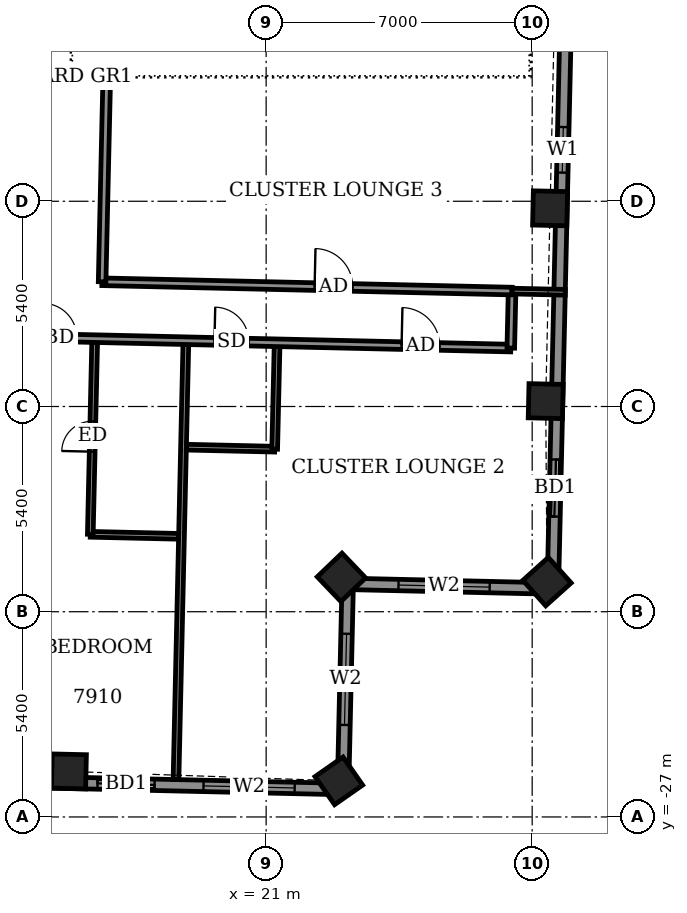
"""IFC4 building model, lengths in metres.
Left out: names, types, materials, properties, quantities, classifications, styles, units other than length and angle.
Written with IfcOpenShell. Run it as: python <this file> out.ifc"""

import sys

from ifc_helpers import new_model, si_unit, direction, frame, frame_2d, origin, origin_2d, place, context, subcontext, project, spatial, rectangle, extrude, element, fill, save


model = new_model("IFC4")
c1 = context("Model", 3, precision=1e-05, world=origin(), true_north=direction((0.0, 1.0)))
c2 = subcontext(c1, "Body", "Model", "MODEL_VIEW")
j1 = project(units=[si_unit("LENGTHUNIT", "METRE"), si_unit("PLANEANGLEUNIT", "RADIAN")], contexts=[c1])
p1 = place(None, origin())
s1 = spatial("IfcSite", under=j1, at=p1, CompositionType="ELEMENT")
p2 = place(p1, origin())
s2 = spatial("IfcBuilding", under=s1, at=p2, CompositionType="ELEMENT")
p3 = place(p2, frame((0.0, 0.0, 309.7)))
s3 = spatial("IfcBuildingStorey", under=s2, at=p3, CompositionType="ELEMENT", Elevation=309.7)
for number, where, z_axis, x_axis in (
    (1, (15.81, -25.802, -0.55), (0.0, 0.0, 1.0), (1.0, -0.023, 0.0)),
    (2, (22.912, -26.05, -0.55), (0.0, 0.0, 1.0), (0.82, 0.572, 0.0)),
    (3, (22.981, -20.696, -0.55), (0.0, 0.0, 1.0), (0.723, 0.691, 0.0)),
    (4, (28.39, -20.808, -0.55), (0.0, 0.0, 1.0), (0.744, 0.668, 0.0)),
    (5, (28.356, -16.059, -0.55), (0.0, 0.0, 1.0), (0.023, 1.0, 0.0)),
    (6, (28.471, -10.986, -0.55), (0.0, 0.0, 1.0), (0.023, 1.0, 0.0)),
):
    element("IfcColumn", number, at=place(p3, frame(where, z_axis=z_axis, x_axis=x_axis)), inside=s3, PredefinedType="COLUMN", context=c2, shape_type="SweptSolid", body=[
        extrude(rectangle(XDim=0.9, YDim=0.9, at=origin_2d()), origin(), (0.0, 0.0, 1.0), 3.6),
    ])
p4 = place(p3, frame((28.544, -20.99, 0.0), z_axis=(0.0, 0.0, 1.0), x_axis=(0.022676396018, 0.999742857471, 0.0)))
e7 = element("IfcWall", 7, at=p4, inside=s3, PredefinedType="SOLIDWALL", context=c2, shape_type="SweptSolid", body=[
    extrude(rectangle(XDim=15.525, YDim=0.3, at=frame_2d((7.762, 0.0))), origin(), (0.0, 0.0, 1.0), 2.55),
])
p5 = place(p4, frame((1.895, 0.0, 0.0)))
e8 = element("IfcOpeningElement", 8, at=p5, cuts=e7, PredefinedType="OPENING", context=c2, shape_type="SweptSolid", body=[
    extrude(rectangle(XDim=1.5, YDim=2.4, at=frame_2d((0.75, 1.2))), frame((0.0, 0.16, 0.0), z_axis=(0.0, -1.0, 0.0), x_axis=(1.0, 0.0, 0.0)), (0.0, 0.0, 1.0), 0.32),
])
p6 = place(p4, frame((10.946, 0.0, 0.9)))
e9 = element("IfcOpeningElement", 9, at=p6, cuts=e7, PredefinedType="OPENING", context=c2, shape_type="SweptSolid", body=[
    extrude(rectangle(XDim=1.2, YDim=1.5, at=frame_2d((0.6, 0.75))), frame((0.0, 0.16, 0.0), z_axis=(0.0, -1.0, 0.0), x_axis=(1.0, 0.0, 0.0)), (0.0, 0.0, 1.0), 0.32),
])
p7 = place(p3, frame((-28.264, -25.102, 0.0), z_axis=(0.0, 0.0, 1.0), x_axis=(0.999742520573, -0.022691244094, 0.0)))
e10 = element("IfcWall", 10, at=p7, inside=s3, PredefinedType="SOLIDWALL", context=c2, shape_type="SweptSolid", body=[
    extrude(rectangle(XDim=51.3, YDim=0.3, at=frame_2d((25.65, 0.0))), origin(), (0.0, 0.0, 1.0), 2.5),
])
p8 = place(p7, frame((1.654, 0.0, 0.0)))
e11 = element("IfcOpeningElement", 11, at=p8, cuts=e10, PredefinedType="OPENING", context=c2, shape_type="SweptSolid", body=[
    extrude(rectangle(XDim=1.5, YDim=2.4, at=frame_2d((0.75, 1.2))), frame((0.0, 0.16, 0.0), z_axis=(0.0, -1.0, 0.0), x_axis=(1.0, 0.0, 0.0)), (0.0, 0.0, 1.0), 0.32),
])
p9 = place(p7, frame((4.936, 0.0, 0.0)))
e12 = element("IfcOpeningElement", 12, at=p9, cuts=e10, PredefinedType="OPENING", context=c2, shape_type="SweptSolid", body=[
    extrude(rectangle(XDim=1.5, YDim=2.4, at=frame_2d((0.75, 1.2))), frame((0.0, 0.16, 0.0), z_axis=(0.0, -1.0, 0.0), x_axis=(1.0, 0.0, 0.0)), (0.0, 0.0, 1.0), 0.32),
])
p10 = place(p7, frame((9.975, 0.0, 0.0)))
e13 = element("IfcOpeningElement", 13, at=p10, cuts=e10, PredefinedType="OPENING", context=c2, shape_type="SweptSolid", body=[
    extrude(rectangle(XDim=1.5, YDim=2.4, at=frame_2d((0.75, 1.2))), frame((0.0, 0.16, 0.0), z_axis=(0.0, -1.0, 0.0), x_axis=(1.0, 0.0, 0.0)), (0.0, 0.0, 1.0), 0.32),
])
p11 = place(p7, frame((15.196, 0.0, 0.0)))
e14 = element("IfcOpeningElement", 14, at=p11, cuts=e10, PredefinedType="OPENING", context=c2, shape_type="SweptSolid", body=[
    extrude(rectangle(XDim=1.5, YDim=2.4, at=frame_2d((0.75, 1.2))), frame((0.0, 0.16, 0.0), z_axis=(0.0, -1.0, 0.0), x_axis=(1.0, 0.0, 0.0)), (0.0, 0.0, 1.0), 0.32),
])
p12 = place(p7, frame((18.5, 0.0, 0.0)))
e15 = element("IfcOpeningElement", 15, at=p12, cuts=e10, PredefinedType="OPENING", context=c2, shape_type="SweptSolid", body=[
    extrude(rectangle(XDim=1.5, YDim=2.4, at=frame_2d((0.75, 1.2))), frame((0.0, 0.16, 0.0), z_axis=(0.0, -1.0, 0.0), x_axis=(1.0, 0.0, 0.0)), (0.0, 0.0, 1.0), 0.32),
])
p13 = place(p7, frame((23.157, 0.0, 0.0)))
e16 = element("IfcOpeningElement", 16, at=p13, cuts=e10, PredefinedType="OPENING", context=c2, shape_type="SweptSolid", body=[
    extrude(rectangle(XDim=1.5, YDim=2.4, at=frame_2d((0.75, 1.2))), frame((0.0, 0.16, 0.0), z_axis=(0.0, -1.0, 0.0), x_axis=(1.0, 0.0, 0.0)), (0.0, 0.0, 1.0), 0.32),
])
p14 = place(p7, frame((26.643, 0.0, 0.0)))
e17 = element("IfcOpeningElement", 17, at=p14, cuts=e10, PredefinedType="OPENING", context=c2, shape_type="SweptSolid", body=[
    extrude(rectangle(XDim=1.5, YDim=2.4, at=frame_2d((0.75, 1.2))), frame((0.0, 0.16, 0.0), z_axis=(0.0, -1.0, 0.0), x_axis=(1.0, 0.0, 0.0)), (0.0, 0.0, 1.0), 0.32),
])
p15 = place(p7, frame((31.275, 0.0, 0.0)))
e18 = element("IfcOpeningElement", 18, at=p15, cuts=e10, PredefinedType="OPENING", context=c2, shape_type="SweptSolid", body=[
    extrude(rectangle(XDim=1.5, YDim=2.4, at=frame_2d((0.75, 1.2))), frame((0.0, 0.16, 0.0), z_axis=(0.0, -1.0, 0.0), x_axis=(1.0, 0.0, 0.0)), (0.0, 0.0, 1.0), 0.32),
])
p16 = place(p7, frame((34.578, 0.0, 0.0)))
e19 = element("IfcOpeningElement", 19, at=p16, cuts=e10, PredefinedType="OPENING", context=c2, shape_type="SweptSolid", body=[
    extrude(rectangle(XDim=1.5, YDim=2.4, at=frame_2d((0.75, 1.2))), frame((0.0, 0.16, 0.0), z_axis=(0.0, -1.0, 0.0), x_axis=(1.0, 0.0, 0.0)), (0.0, 0.0, 1.0), 0.32),
])
p17 = place(p7, frame((39.75, 0.0, 0.0)))
e20 = element("IfcOpeningElement", 20, at=p17, cuts=e10, PredefinedType="OPENING", context=c2, shape_type="SweptSolid", body=[
    extrude(rectangle(XDim=1.5, YDim=2.4, at=frame_2d((0.75, 1.2))), frame((0.0, 0.16, 0.0), z_axis=(0.0, -1.0, 0.0), x_axis=(1.0, 0.0, 0.0)), (0.0, 0.0, 1.0), 0.32),
])
p18 = place(p7, frame((44.839, 0.0, 0.0)))
e21 = element("IfcOpeningElement", 21, at=p18, cuts=e10, PredefinedType="OPENING", context=c2, shape_type="SweptSolid", body=[
    extrude(rectangle(XDim=1.5, YDim=2.4, at=frame_2d((0.75, 1.2))), frame((0.0, 0.16, 0.0), z_axis=(0.0, -1.0, 0.0), x_axis=(1.0, 0.0, 0.0)), (0.0, 0.0, 1.0), 0.32),
])
p19 = place(p7, frame((47.628, 0.0, 0.9)))
e22 = element("IfcOpeningElement", 22, at=p19, cuts=e10, PredefinedType="OPENING", context=c2, shape_type="SweptSolid", body=[
    extrude(rectangle(XDim=2.4, YDim=1.5, at=frame_2d((1.2, 0.75))), frame((0.0, 0.16, 0.0), z_axis=(0.0, -1.0, 0.0), x_axis=(1.0, 0.0, 0.0)), (0.0, 0.0, 1.0), 0.32),
])
p20 = place(p3, frame((23.023, -26.266, 0.0), z_axis=(0.0, 0.0, 1.0), x_axis=(0.022784045517, 0.999740409941, 0.0)))
e23 = element("IfcWall", 23, at=p20, inside=s3, PredefinedType="SOLIDWALL", context=c2, shape_type="SweptSolid", body=[
    extrude(rectangle(XDim=5.401, YDim=0.3, at=frame_2d((2.7, 0.0))), origin(), (0.0, 0.0, 1.0), 2.55),
])
p21 = place(p20, frame((1.687, 0.0, 0.9)))
e24 = element("IfcOpeningElement", 24, at=p21, cuts=e23, PredefinedType="OPENING", context=c2, shape_type="SweptSolid", body=[
    extrude(rectangle(XDim=2.4, YDim=1.5, at=frame_2d((1.2, 0.75))), frame((0.0, 0.16, 0.0), z_axis=(0.0, -1.0, 0.0), x_axis=(1.0, 0.0, 0.0)), (0.0, 0.0, 1.0), 0.32),
])
p22 = place(p3, frame((23.146, -20.867, 0.0), z_axis=(0.0, 0.0, 1.0), x_axis=(0.999740292565, -0.022789195272, 0.0)))
e25 = element("IfcWall", 25, at=p22, inside=s3, PredefinedType="SOLIDWALL", context=c2, shape_type="SweptSolid", body=[
    extrude(rectangle(XDim=5.399, YDim=0.3, at=frame_2d((2.7, 0.0))), origin(), (0.0, 0.0, 1.0), 2.55),
])
p23 = place(p22, frame((1.337, 0.0, 0.9)))
e26 = element("IfcOpeningElement", 26, at=p23, cuts=e25, PredefinedType="OPENING", context=c2, shape_type="SweptSolid", body=[
    extrude(rectangle(XDim=2.4, YDim=1.5, at=frame_2d((1.2, 0.75))), frame((0.0, 0.16, 0.0), z_axis=(0.0, -1.0, 0.0), x_axis=(1.0, 0.0, 0.0)), (0.0, 0.0, 1.0), 0.32),
])
p24 = place(p3, frame((18.628, -26.016, 0.0), z_axis=(0.0, 0.0, 1.0), x_axis=(0.022623082162, 0.999744065325, 0.0)))
e27 = element("IfcWall", 27, at=p24, inside=s3, PredefinedType="PARTITIONING", context=c2, shape_type="SweptSolid", body=[
    extrude(rectangle(XDim=11.45, YDim=0.15, at=frame_2d((5.725, 0.0))), origin(), (0.0, 0.0, 1.0), 2.5),
])
p25 = place(p3, frame((16.373, -19.563, 0.0), z_axis=(0.0, 0.0, 1.0), x_axis=(0.999740478815, -0.022781023197, 0.0)))
e28 = element("IfcWall", 28, at=p25, inside=s3, PredefinedType="PARTITIONING", context=c2, shape_type="SweptSolid", body=[
    extrude(rectangle(XDim=2.325, YDim=0.15, at=frame_2d((1.163, 0.0))), origin(), (0.0, 0.0, 1.0), 3.05),
])
p26 = place(p3, frame((16.373, -19.563, 0.0), z_axis=(0.0, 0.0, 1.0), x_axis=(0.022773025649, 0.999740661023, 0.0)))
e29 = element("IfcWall", 29, at=p26, inside=s3, PredefinedType="PARTITIONING", context=c2, shape_type="SweptSolid", body=[
    extrude(rectangle(XDim=5.049, YDim=0.15, at=frame_2d((2.525, 0.0))), origin(), (0.0, 0.0, 1.0), 3.05),
])
p27 = place(p26, frame((2.175, 0.0, 0.0)))
e30 = element("IfcOpeningElement", 30, at=p27, cuts=e29, PredefinedType="OPENING", context=c2, shape_type="SweptSolid", body=[
    extrude(rectangle(XDim=0.8, YDim=2.1, at=frame_2d((0.4, 1.05))), frame((0.0, 0.085, 0.0), z_axis=(0.0, -1.0, 0.0), x_axis=(1.0, 0.0, 0.0)), (0.0, 0.0, 1.0), 0.17),
])
p28 = place(p3, frame((18.901, -17.27, 0.0), z_axis=(0.0, 0.0, 1.0), x_axis=(0.99974031529, -0.022788198363, 0.0)))
e31 = element("IfcWall", 31, at=p28, inside=s3, PredefinedType="PARTITIONING", context=c2, shape_type="SweptSolid", body=[
    extrude(rectangle(XDim=2.325, YDim=0.15, at=frame_2d((1.162, 0.0))), origin(), (0.0, 0.0, 1.0), 3.05),
])
p29 = place(p3, frame((21.225, -17.323, 0.0), z_axis=(0.0, 0.0, 1.0), x_axis=(0.022961663075, 0.999736346258, 0.0)))
e32 = element("IfcWall", 32, at=p29, inside=s3, PredefinedType="PARTITIONING", context=c2, shape_type="SweptSolid", body=[
    extrude(rectangle(XDim=2.701, YDim=0.15, at=frame_2d((1.35, 0.0))), origin(), (0.0, 0.0, 1.0), 3.05),
])
p30 = place(p3, frame((-31.347, -13.329, 0.0), z_axis=(0.0, 0.0, 1.0), x_axis=(0.999742613079, -0.022687168058, 0.0)))
e33 = element("IfcWall", 33, at=p30, inside=s3, PredefinedType="PARTITIONING", context=c2, shape_type="SweptSolid", body=[
    extrude(rectangle(XDim=58.799, YDim=0.2, at=frame_2d((29.399, 0.0))), origin(), (0.0, 0.0, 1.0), 3.05),
])
p31 = place(p30, frame((1.35, 0.0, 0.0)))
e34 = element("IfcOpeningElement", 34, at=p31, cuts=e33, PredefinedType="OPENING", context=c2, shape_type="SweptSolid", body=[
    extrude(rectangle(XDim=1.0, YDim=2.1, at=frame_2d((0.5, 1.05))), frame((0.0, 0.11, 0.0), z_axis=(0.0, -1.0, 0.0), x_axis=(1.0, 0.0, 0.0)), (0.0, 0.0, 1.0), 0.22),
])
p32 = place(p30, frame((5.95, 0.0, 0.0)))
e35 = element("IfcOpeningElement", 35, at=p32, cuts=e33, PredefinedType="OPENING", context=c2, shape_type="SweptSolid", body=[
    extrude(rectangle(XDim=0.9, YDim=2.1, at=frame_2d((0.45, 1.05))), frame((0.0, 0.11, 0.0), z_axis=(0.0, -1.0, 0.0), x_axis=(1.0, 0.0, 0.0)), (0.0, 0.0, 1.0), 0.22),
])
p33 = place(p30, frame((10.575, 0.0, 0.0)))
e36 = element("IfcOpeningElement", 36, at=p33, cuts=e33, PredefinedType="OPENING", context=c2, shape_type="SweptSolid", body=[
    extrude(rectangle(XDim=0.9, YDim=2.1, at=frame_2d((0.45, 1.05))), frame((0.0, 0.11, 0.0), z_axis=(0.0, -1.0, 0.0), x_axis=(1.0, 0.0, 0.0)), (0.0, 0.0, 1.0), 0.22),
])
p34 = place(p30, frame((12.425, 0.0, 0.0)))
e37 = element("IfcOpeningElement", 37, at=p34, cuts=e33, PredefinedType="OPENING", context=c2, shape_type="SweptSolid", body=[
    extrude(rectangle(XDim=0.9, YDim=2.1, at=frame_2d((0.45, 1.05))), frame((0.0, 0.11, 0.0), z_axis=(0.0, -1.0, 0.0), x_axis=(1.0, 0.0, 0.0)), (0.0, 0.0, 1.0), 0.22),
])
p35 = place(p30, frame((19.075, 0.0, 0.0)))
e38 = element("IfcOpeningElement", 38, at=p35, cuts=e33, PredefinedType="OPENING", context=c2, shape_type="SweptSolid", body=[
    extrude(rectangle(XDim=0.9, YDim=2.1, at=frame_2d((0.45, 1.05))), frame((0.0, 0.11, 0.0), z_axis=(0.0, -1.0, 0.0), x_axis=(1.0, 0.0, 0.0)), (0.0, 0.0, 1.0), 0.22),
])
p36 = place(p30, frame((20.95, 0.0, 0.0)))
e39 = element("IfcOpeningElement", 39, at=p36, cuts=e33, PredefinedType="OPENING", context=c2, shape_type="SweptSolid", body=[
    extrude(rectangle(XDim=0.9, YDim=2.1, at=frame_2d((0.45, 1.05))), frame((0.0, 0.11, 0.0), z_axis=(0.0, -1.0, 0.0), x_axis=(1.0, 0.0, 0.0)), (0.0, 0.0, 1.0), 0.22),
])
p37 = place(p30, frame((27.625, 0.0, 0.0)))
e40 = element("IfcOpeningElement", 40, at=p37, cuts=e33, PredefinedType="OPENING", context=c2, shape_type="SweptSolid", body=[
    extrude(rectangle(XDim=0.9, YDim=2.1, at=frame_2d((0.45, 1.05))), frame((0.0, 0.11, 0.0), z_axis=(0.0, -1.0, 0.0), x_axis=(1.0, 0.0, 0.0)), (0.0, 0.0, 1.0), 0.22),
])
p38 = place(p30, frame((29.475, 0.0, 0.0)))
e41 = element("IfcOpeningElement", 41, at=p38, cuts=e33, PredefinedType="OPENING", context=c2, shape_type="SweptSolid", body=[
    extrude(rectangle(XDim=0.9, YDim=2.1, at=frame_2d((0.45, 1.05))), frame((0.0, 0.11, 0.0), z_axis=(0.0, -1.0, 0.0), x_axis=(1.0, 0.0, 0.0)), (0.0, 0.0, 1.0), 0.22),
])
p39 = place(p30, frame((36.125, 0.0, 0.0)))
e42 = element("IfcOpeningElement", 42, at=p39, cuts=e33, PredefinedType="OPENING", context=c2, shape_type="SweptSolid", body=[
    extrude(rectangle(XDim=0.9, YDim=2.1, at=frame_2d((0.45, 1.05))), frame((0.0, 0.11, 0.0), z_axis=(0.0, -1.0, 0.0), x_axis=(1.0, 0.0, 0.0)), (0.0, 0.0, 1.0), 0.22),
])
p40 = place(p30, frame((37.95, 0.0, 0.0)))
e43 = element("IfcOpeningElement", 43, at=p40, cuts=e33, PredefinedType="OPENING", context=c2, shape_type="SweptSolid", body=[
    extrude(rectangle(XDim=0.9, YDim=2.1, at=frame_2d((0.45, 1.05))), frame((0.0, 0.11, 0.0), z_axis=(0.0, -1.0, 0.0), x_axis=(1.0, 0.0, 0.0)), (0.0, 0.0, 1.0), 0.22),
])
p41 = place(p30, frame((44.6, 0.0, 0.0)))
e44 = element("IfcOpeningElement", 44, at=p41, cuts=e33, PredefinedType="OPENING", context=c2, shape_type="SweptSolid", body=[
    extrude(rectangle(XDim=0.9, YDim=2.1, at=frame_2d((0.45, 1.05))), frame((0.0, 0.11, 0.0), z_axis=(0.0, -1.0, 0.0), x_axis=(1.0, 0.0, 0.0)), (0.0, 0.0, 1.0), 0.22),
])
p42 = place(p30, frame((46.475, 0.0, 0.0)))
e45 = element("IfcOpeningElement", 45, at=p42, cuts=e33, PredefinedType="OPENING", context=c2, shape_type="SweptSolid", body=[
    extrude(rectangle(XDim=0.9, YDim=2.1, at=frame_2d((0.45, 1.05))), frame((0.0, 0.11, 0.0), z_axis=(0.0, -1.0, 0.0), x_axis=(1.0, 0.0, 0.0)), (0.0, 0.0, 1.0), 0.22),
])
p43 = place(p30, frame((55.925, 0.0, 0.0)))
e46 = element("IfcOpeningElement", 46, at=p43, cuts=e33, PredefinedType="OPENING", context=c2, shape_type="SweptSolid", body=[
    extrude(rectangle(XDim=1.0, YDim=2.1, at=frame_2d((0.5, 1.05))), frame((0.0, 0.11, 0.0), z_axis=(0.0, -1.0, 0.0), x_axis=(1.0, 0.0, 0.0)), (0.0, 0.0, 1.0), 0.22),
])
p44 = place(p30, frame((51.0, 0.0, 0.0)))
e47 = element("IfcOpeningElement", 47, at=p44, cuts=e33, PredefinedType="OPENING", context=c2, shape_type="SweptSolid", body=[
    extrude(rectangle(XDim=0.9, YDim=2.1, at=frame_2d((0.45, 1.05))), frame((0.0, 0.11, 0.0), z_axis=(0.0, -1.0, 0.0), x_axis=(1.0, 0.0, 0.0)), (0.0, 0.0, 1.0), 0.22),
])
p45 = place(p3, frame((27.437, -14.663, 0.0), z_axis=(0.0, 0.0, 1.0), x_axis=(0.022617910375, 0.999744182344, 0.0)))
e48 = element("IfcWall", 48, at=p45, inside=s3, PredefinedType="PARTITIONING", context=c2, shape_type="SweptSolid", body=[
    extrude(rectangle(XDim=1.5, YDim=0.2, at=frame_2d((0.75, 0.0))), origin(), (0.0, 0.0, 1.0), 3.05),
])
p46 = place(p3, frame((16.679, -12.918, 0.0), z_axis=(0.0, 0.0, 1.0), x_axis=(0.999742162372, -0.022707020428, 0.0)))
e49 = element("IfcWall", 49, at=p46, inside=s3, PredefinedType="PARTITIONING", context=c2, shape_type="SweptSolid", body=[
    extrude(rectangle(XDim=10.795, YDim=0.2, at=frame_2d((5.397, 0.0))), origin(), (0.0, 0.0, 1.0), 3.05),
])
p47 = place(p46, frame((5.598, 0.0, 0.0)))
e50 = element("IfcOpeningElement", 50, at=p47, cuts=e49, PredefinedType="OPENING", context=c2, shape_type="SweptSolid", body=[
    extrude(rectangle(XDim=1.0, YDim=2.1, at=frame_2d((0.5, 1.05))), frame((0.0, 0.11, 0.0), z_axis=(0.0, -1.0, 0.0), x_axis=(1.0, 0.0, 0.0)), (0.0, 0.0, 1.0), 0.22),
])
p48 = place(p3, frame((16.684, -12.919, 0.0), z_axis=(0.0, 0.0, 1.0), x_axis=(0.022667483124, 0.999743059595, 0.0)))
e51 = element("IfcWall", 51, at=p48, inside=s3, PredefinedType="PARTITIONING", context=c2, shape_type="SweptSolid", body=[
    extrude(rectangle(XDim=5.245, YDim=0.2, at=frame_2d((2.623, 0.0))), origin(), (0.0, 0.0, 1.0), 3.05),
])
p49 = place(p3, frame((27.467, -13.163, 0.0), z_axis=(0.0, 0.0, 1.0), x_axis=(0.999740667531, -0.022772739949, 0.0)))
e52 = element("IfcWall", 52, at=p49, inside=s3, PredefinedType="PARTITIONING", context=c2, shape_type="SweptSolid", body=[
    extrude(rectangle(XDim=1.404, YDim=0.15, at=frame_2d((0.702, 0.0))), origin(), (0.0, 0.0, 1.0), 2.55),
])
p50 = place(p5, origin())
e53 = element("IfcDoor", 53, at=p50, inside=s3, OperationType="SLIDING_TO_LEFT", PredefinedType="DOOR", context=c2, shape_type="SweptSolid", body=[
    extrude(rectangle(XDim=1.5, YDim=2.4, at=frame_2d((0.75, 1.2))), frame((0.0, 0.025, 0.0), z_axis=(0.0, -1.0, 0.0), x_axis=(1.0, 0.0, 0.0)), (0.0, 0.0, 1.0), 0.05),
])
fill(e8, e53)
p51 = place(p6, origin())
e54 = element("IfcWindow", 54, at=p51, inside=s3, PartitioningType="SINGLE_PANEL", PredefinedType="WINDOW", context=c2, shape_type="SweptSolid", body=[
    extrude(rectangle(XDim=1.2, YDim=1.5, at=frame_2d((0.6, 0.75))), frame((0.0, 0.03, 0.0), z_axis=(0.0, -1.0, 0.0), x_axis=(1.0, 0.0, 0.0)), (0.0, 0.0, 1.0), 0.06),
])
fill(e9, e54)
p52 = place(p18, origin())
e55 = element("IfcDoor", 55, at=p52, inside=s3, OperationType="SLIDING_TO_LEFT", PredefinedType="DOOR", context=c2, shape_type="SweptSolid", body=[
    extrude(rectangle(XDim=1.5, YDim=2.4, at=frame_2d((0.75, 1.2))), frame((0.0, 0.025, 0.0), z_axis=(0.0, -1.0, 0.0), x_axis=(1.0, 0.0, 0.0)), (0.0, 0.0, 1.0), 0.05),
])
fill(e21, e55)
p53 = place(p19, origin())
e56 = element("IfcWindow", 56, at=p53, inside=s3, PartitioningType="DOUBLE_PANEL_VERTICAL", PredefinedType="WINDOW", context=c2, shape_type="SweptSolid", body=[
    extrude(rectangle(XDim=2.4, YDim=1.5, at=frame_2d((1.2, 0.75))), frame((0.0, 0.03, 0.0), z_axis=(0.0, -1.0, 0.0), x_axis=(1.0, 0.0, 0.0)), (0.0, 0.0, 1.0), 0.06),
])
fill(e22, e56)
p54 = place(p21, origin())
e57 = element("IfcWindow", 57, at=p54, inside=s3, PartitioningType="DOUBLE_PANEL_VERTICAL", PredefinedType="WINDOW", context=c2, shape_type="SweptSolid", body=[
    extrude(rectangle(XDim=2.4, YDim=1.5, at=frame_2d((1.2, 0.75))), frame((0.0, 0.03, 0.0), z_axis=(0.0, -1.0, 0.0), x_axis=(1.0, 0.0, 0.0)), (0.0, 0.0, 1.0), 0.06),
])
fill(e24, e57)
p55 = place(p23, origin())
e58 = element("IfcWindow", 58, at=p55, inside=s3, PartitioningType="DOUBLE_PANEL_VERTICAL", PredefinedType="WINDOW", context=c2, shape_type="SweptSolid", body=[
    extrude(rectangle(XDim=2.4, YDim=1.5, at=frame_2d((1.2, 0.75))), frame((0.0, 0.03, 0.0), z_axis=(0.0, -1.0, 0.0), x_axis=(1.0, 0.0, 0.0)), (0.0, 0.0, 1.0), 0.06),
])
fill(e26, e58)
p56 = place(p42, origin())
e59 = element("IfcDoor", 59, at=p56, inside=s3, OperationType="SINGLE_SWING_RIGHT", PredefinedType="DOOR", context=c2, shape_type="SweptSolid", body=[
    extrude(rectangle(XDim=0.9, YDim=2.1, at=frame_2d((0.45, 1.05))), frame((0.0, 0.025, 0.0), z_axis=(0.0, -1.0, 0.0), x_axis=(1.0, 0.0, 0.0)), (0.0, 0.0, 1.0), 0.05),
])
fill(e45, e59)
p57 = place(p27, origin())
e60 = element("IfcDoor", 60, at=p57, inside=s3, OperationType="SINGLE_SWING_RIGHT", PredefinedType="DOOR", context=c2, shape_type="SweptSolid", body=[
    extrude(rectangle(XDim=0.8, YDim=2.1, at=frame_2d((0.4, 1.05))), frame((0.0, 0.025, 0.0), z_axis=(0.0, -1.0, 0.0), x_axis=(1.0, 0.0, 0.0)), (0.0, 0.0, 1.0), 0.05),
])
fill(e30, e60)
p58 = place(p43, origin())
e61 = element("IfcDoor", 61, at=p58, inside=s3, OperationType="SINGLE_SWING_RIGHT", PredefinedType="DOOR", context=c2, shape_type="SweptSolid", body=[
    extrude(rectangle(XDim=1.0, YDim=2.1, at=frame_2d((0.5, 1.05))), frame((0.0, 0.025, 0.0), z_axis=(0.0, -1.0, 0.0), x_axis=(1.0, 0.0, 0.0)), (0.0, 0.0, 1.0), 0.05),
])
fill(e46, e61)
p59 = place(p44, origin())
e62 = element("IfcDoor", 62, at=p59, inside=s3, OperationType="SINGLE_SWING_RIGHT", PredefinedType="DOOR", context=c2, shape_type="SweptSolid", body=[
    extrude(rectangle(XDim=0.9, YDim=2.1, at=frame_2d((0.45, 1.05))), frame((0.0, 0.025, 0.0), z_axis=(0.0, -1.0, 0.0), x_axis=(1.0, 0.0, 0.0)), (0.0, 0.0, 1.0), 0.05),
])
fill(e47, e62)
p60 = place(p47, origin())
e63 = element("IfcDoor", 63, at=p60, inside=s3, OperationType="SINGLE_SWING_LEFT", PredefinedType="DOOR", context=c2, shape_type="SweptSolid", body=[
    extrude(rectangle(XDim=1.0, YDim=2.1, at=frame_2d((0.5, 1.05))), frame((0.0, 0.025, 0.0), z_axis=(0.0, -1.0, 0.0), x_axis=(1.0, 0.0, 0.0)), (0.0, 0.0, 1.0), 0.05),
])
fill(e50, e63)
save(model, sys.argv[1])
